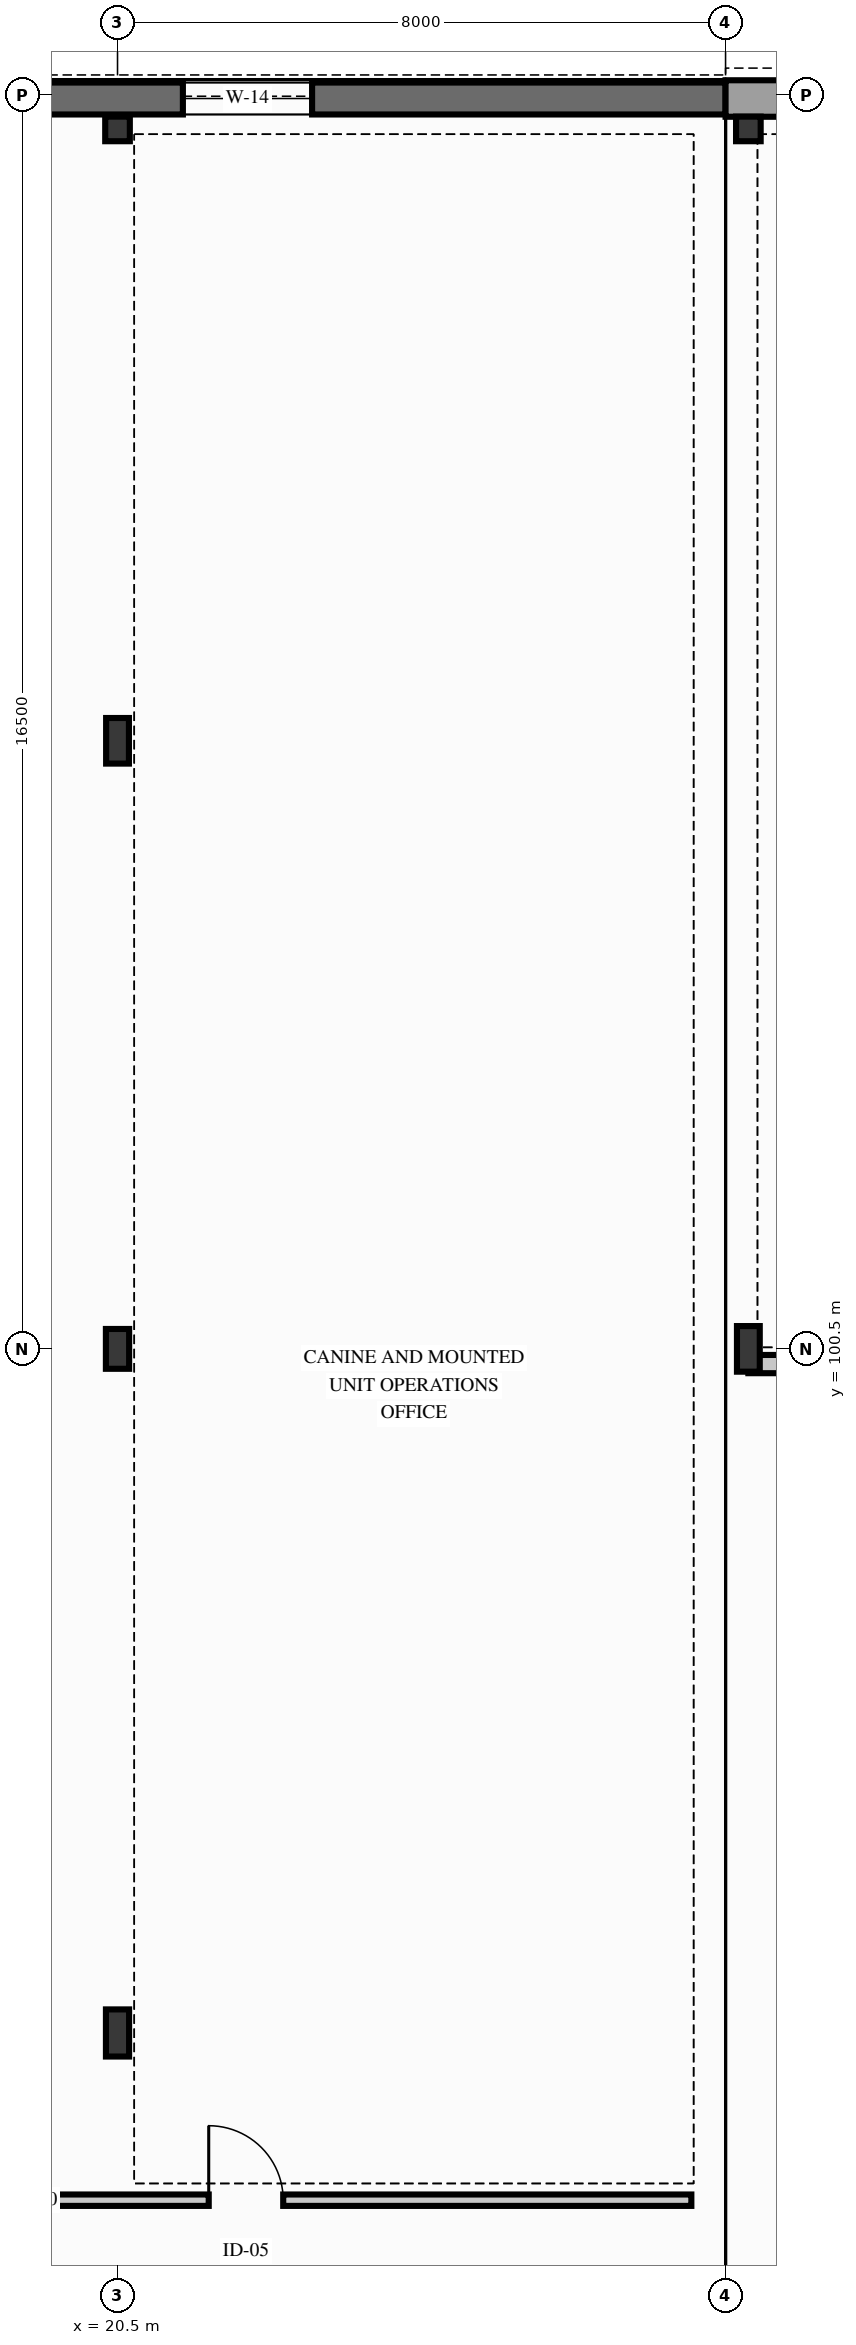
"""IFC4 building model, lengths in metres.
Left out: names, types, materials, properties, quantities, classifications, styles, units other than length and angle.
Written with IfcOpenShell. Run it as: python <this file> out.ifc"""

import sys

from ifc_helpers import new_model, si_unit, direction, frame, frame_2d, origin, origin_2d, place, context, subcontext, project, spatial, rectangle, hollow_circle, i_section, extrude, element, fill, save


model = new_model("IFC4")
c1 = context("Model", 3, precision=1e-05, world=origin(), true_north=direction((0.0, 1.0)))
c2 = subcontext(c1, "Body", "Model", "MODEL_VIEW")
j1 = project(units=[si_unit("LENGTHUNIT", "METRE"), si_unit("PLANEANGLEUNIT", "RADIAN")], contexts=[c1])
p1 = place(None, origin())
s1 = spatial("IfcSite", under=j1, at=p1, CompositionType="ELEMENT")
p2 = place(p1, origin())
s2 = spatial("IfcBuilding", under=s1, at=p2, CompositionType="ELEMENT")
p3 = place(p2, frame((0.0, 0.0, 5.1)))
s3 = spatial("IfcBuildingStorey", under=s2, at=p3, CompositionType="ELEMENT", Elevation=5.1)
p4 = place(p3, frame((28.8, 100.5, 0.0), z_axis=(0.0, 0.0, 1.0), x_axis=(1.0, 0.0, 0.0)))
e1 = element("IfcColumn", 1, at=p4, inside=s3, PredefinedType="COLUMN", context=c2, shape_type="SweptSolid", body=[
    extrude(i_section(OverallWidth=0.3, OverallDepth=0.6, WebThickness=0.015, FlangeThickness=0.03, FilletRadius=0.027, at=origin_2d()), origin(), (0.0, 0.0, 1.0), 4.2),
])
p5 = place(p3, frame((28.8, 116.55, 0.0), z_axis=(0.0, 0.0, 1.0), x_axis=(1.0, 0.0, 0.0)))
e2 = element("IfcColumn", 2, at=p5, inside=s3, PredefinedType="COLUMN", context=c2, shape_type="SweptSolid", body=[
    extrude(hollow_circle(Radius=0.162, WallThickness=0.016, at=origin_2d()), origin(), (0.0, 0.0, 1.0), 4.2),
])
p6 = place(p3, frame((20.5, 91.5, 0.0), z_axis=(0.0, 0.0, 1.0), x_axis=(1.0, 0.0, 0.0)))
e3 = element("IfcColumn", 3, at=p6, inside=s3, PredefinedType="COLUMN", context=c2, shape_type="SweptSolid", body=[
    extrude(i_section(OverallWidth=0.305, OverallDepth=0.62, WebThickness=0.021, FlangeThickness=0.04, FilletRadius=0.027, at=origin_2d()), origin(), (0.0, 0.0, 1.0), 3.94),
])
p7 = place(p3, frame((20.5, 100.5, 0.0), z_axis=(0.0, 0.0, 1.0), x_axis=(1.0, 0.0, 0.0)))
e4 = element("IfcColumn", 4, at=p7, inside=s3, PredefinedType="COLUMN", context=c2, shape_type="SweptSolid", body=[
    extrude(i_section(OverallWidth=0.306, OverallDepth=0.524, WebThickness=0.021, FlangeThickness=0.04, FilletRadius=0.027, at=origin_2d()), origin(), (0.0, 0.0, 1.0), 3.94),
])
p8 = place(p3, frame((20.5, 108.5, 0.0), z_axis=(0.0, 0.0, 1.0), x_axis=(1.0, 0.0, 0.0)))
e5 = element("IfcColumn", 5, at=p8, inside=s3, PredefinedType="COLUMN", context=c2, shape_type="SweptSolid", body=[
    extrude(i_section(OverallWidth=0.3, OverallDepth=0.6, WebThickness=0.015, FlangeThickness=0.03, FilletRadius=0.027, at=origin_2d()), origin(), (0.0, 0.0, 1.0), 3.94),
])
p9 = place(p3, frame((20.5, 116.55, 0.0), z_axis=(0.0, 0.0, 1.0), x_axis=(1.0, 0.0, 0.0)))
e6 = element("IfcColumn", 6, at=p9, inside=s3, PredefinedType="COLUMN", context=c2, shape_type="SweptSolid", body=[
    extrude(hollow_circle(Radius=0.162, WallThickness=0.016, at=origin_2d()), origin(), (0.0, 0.0, 1.0), 3.94),
])
p10 = place(p3, frame((4.51, 116.95, 0.0), z_axis=(0.0, 0.0, 1.0), x_axis=(1.0, 0.0, 0.0)))
e7 = element("IfcWall", 7, at=p10, inside=s3, PredefinedType="SOLIDWALL", context=c2, shape_type="SweptSolid", body=[
    extrude(rectangle(XDim=23.99, YDim=0.42, at=frame_2d((11.995, 0.0))), origin(), (0.0, 0.0, 1.0), 3.94),
])
p11 = place(p10, frame((1.65, 0.0, 0.85)))
e8 = element("IfcOpeningElement", 8, at=p11, cuts=e7, PredefinedType="OPENING", context=c2, shape_type="SweptSolid", body=[
    extrude(rectangle(XDim=1.3, YDim=2.15, at=frame_2d((0.65, 1.075))), frame((0.0, 0.22, 0.0), z_axis=(0.0, -1.0, 0.0), x_axis=(1.0, 0.0, 0.0)), (0.0, 0.0, 1.0), 0.44),
])
p12 = place(p10, frame((5.45, 0.0, 0.85)))
e9 = element("IfcOpeningElement", 9, at=p12, cuts=e7, PredefinedType="OPENING", context=c2, shape_type="SweptSolid", body=[
    extrude(rectangle(XDim=1.5, YDim=2.3, at=frame_2d((0.75, 1.15))), frame((0.0, 0.22, 0.0), z_axis=(0.0, -1.0, 0.0), x_axis=(1.0, 0.0, 0.0)), (0.0, 0.0, 1.0), 0.44),
])
p13 = place(p10, frame((9.25, 0.0, 0.85)))
e10 = element("IfcOpeningElement", 10, at=p13, cuts=e7, PredefinedType="OPENING", context=c2, shape_type="SweptSolid", body=[
    extrude(rectangle(XDim=1.6, YDim=2.4, at=frame_2d((0.8, 1.2))), frame((0.0, 0.22, 0.0), z_axis=(0.0, -1.0, 0.0), x_axis=(1.0, 0.0, 0.0)), (0.0, 0.0, 1.0), 0.44),
])
p14 = place(p10, frame((16.85, 0.0, 0.85)))
e11 = element("IfcOpeningElement", 11, at=p14, cuts=e7, PredefinedType="OPENING", context=c2, shape_type="SweptSolid", body=[
    extrude(rectangle(XDim=1.7, YDim=2.35, at=frame_2d((0.85, 1.175))), frame((0.0, 0.22, 0.0), z_axis=(0.0, -1.0, 0.0), x_axis=(1.0, 0.0, 0.0)), (0.0, 0.0, 1.0), 0.44),
])
p15 = place(p3, frame((28.5, 116.95, 0.0), z_axis=(0.0, 0.0, 1.0), x_axis=(1.0, 0.0, 0.0)))
e12 = element("IfcWall", 12, at=p15, inside=s3, PredefinedType="SOLIDWALL", context=c2, shape_type="SweptSolid", body=[
    extrude(rectangle(XDim=55.76, YDim=0.48, at=frame_2d((27.88, 0.0))), origin(), (0.0, 0.0, 1.0), 3.94),
])
p16 = place(p15, frame((1.65, 0.0, 0.95)))
e13 = element("IfcOpeningElement", 13, at=p16, cuts=e12, PredefinedType="OPENING", context=c2, shape_type="SweptSolid", body=[
    extrude(rectangle(XDim=1.4, YDim=2.2, at=frame_2d((0.7, 1.1))), frame((0.0, 0.25, 0.0), z_axis=(0.0, -1.0, 0.0), x_axis=(1.0, 0.0, 0.0)), (0.0, 0.0, 1.0), 0.5),
])
p17 = place(p15, frame((5.65, 0.0, 0.95)))
e14 = element("IfcOpeningElement", 14, at=p17, cuts=e12, PredefinedType="OPENING", context=c2, shape_type="SweptSolid", body=[
    extrude(rectangle(XDim=1.2, YDim=2.1, at=frame_2d((0.6, 1.05))), frame((0.0, 0.25, 0.0), z_axis=(0.0, -1.0, 0.0), x_axis=(1.0, 0.0, 0.0)), (0.0, 0.0, 1.0), 0.5),
])
p18 = place(p15, frame((9.65, 0.0, 0.95)))
e15 = element("IfcOpeningElement", 15, at=p18, cuts=e12, PredefinedType="OPENING", context=c2, shape_type="SweptSolid", body=[
    extrude(rectangle(XDim=1.1, YDim=1.5, at=frame_2d((0.55, 0.75))), frame((0.0, 0.25, 0.0), z_axis=(0.0, -1.0, 0.0), x_axis=(1.0, 0.0, 0.0)), (0.0, 0.0, 1.0), 0.5),
])
p19 = place(p15, frame((13.65, 0.0, 0.95)))
e16 = element("IfcOpeningElement", 16, at=p19, cuts=e12, PredefinedType="OPENING", context=c2, shape_type="SweptSolid", body=[
    extrude(rectangle(XDim=1.0, YDim=1.6, at=frame_2d((0.5, 0.8))), frame((0.0, 0.25, 0.0), z_axis=(0.0, -1.0, 0.0), x_axis=(1.0, 0.0, 0.0)), (0.0, 0.0, 1.0), 0.5),
])
p20 = place(p15, frame((21.65, 0.0, 0.95)))
e17 = element("IfcOpeningElement", 17, at=p20, cuts=e12, PredefinedType="OPENING", context=c2, shape_type="SweptSolid", body=[
    extrude(rectangle(XDim=1.2, YDim=2.1, at=frame_2d((0.6, 1.05))), frame((0.0, 0.25, 0.0), z_axis=(0.0, -1.0, 0.0), x_axis=(1.0, 0.0, 0.0)), (0.0, 0.0, 1.0), 0.5),
])
p21 = place(p15, frame((29.65, 0.0, 0.95)))
e18 = element("IfcOpeningElement", 18, at=p21, cuts=e12, PredefinedType="OPENING", context=c2, shape_type="SweptSolid", body=[
    extrude(rectangle(XDim=1.0, YDim=1.6, at=frame_2d((0.5, 0.8))), frame((0.0, 0.25, 0.0), z_axis=(0.0, -1.0, 0.0), x_axis=(1.0, 0.0, 0.0)), (0.0, 0.0, 1.0), 0.5),
])
p22 = place(p15, frame((33.65, 0.0, 0.95)))
e19 = element("IfcOpeningElement", 19, at=p22, cuts=e12, PredefinedType="OPENING", context=c2, shape_type="SweptSolid", body=[
    extrude(rectangle(XDim=1.4, YDim=2.2, at=frame_2d((0.7, 1.1))), frame((0.0, 0.25, 0.0), z_axis=(0.0, -1.0, 0.0), x_axis=(1.0, 0.0, 0.0)), (0.0, 0.0, 1.0), 0.5),
])
p23 = place(p15, frame((37.65, 0.0, 0.95)))
e20 = element("IfcOpeningElement", 20, at=p23, cuts=e12, PredefinedType="OPENING", context=c2, shape_type="SweptSolid", body=[
    extrude(rectangle(XDim=1.2, YDim=2.1, at=frame_2d((0.6, 1.05))), frame((0.0, 0.25, 0.0), z_axis=(0.0, -1.0, 0.0), x_axis=(1.0, 0.0, 0.0)), (0.0, 0.0, 1.0), 0.5),
])
p24 = place(p15, frame((41.65, 0.0, 0.95)))
e21 = element("IfcOpeningElement", 21, at=p24, cuts=e12, PredefinedType="OPENING", context=c2, shape_type="SweptSolid", body=[
    extrude(rectangle(XDim=1.1, YDim=1.5, at=frame_2d((0.55, 0.75))), frame((0.0, 0.25, 0.0), z_axis=(0.0, -1.0, 0.0), x_axis=(1.0, 0.0, 0.0)), (0.0, 0.0, 1.0), 0.5),
])
p25 = place(p15, frame((45.65, 0.0, 0.95)))
e22 = element("IfcOpeningElement", 22, at=p25, cuts=e12, PredefinedType="OPENING", context=c2, shape_type="SweptSolid", body=[
    extrude(rectangle(XDim=1.0, YDim=1.6, at=frame_2d((0.5, 0.8))), frame((0.0, 0.25, 0.0), z_axis=(0.0, -1.0, 0.0), x_axis=(1.0, 0.0, 0.0)), (0.0, 0.0, 1.0), 0.5),
])
p26 = place(p3, frame((16.2, 89.3, 0.0), z_axis=(0.0, 0.0, 1.0), x_axis=(1.0, 0.0, 0.0)))
e23 = element("IfcWall", 23, at=p26, inside=s3, PredefinedType="PARTITIONING", context=c2, shape_type="SweptSolid", body=[
    extrude(rectangle(XDim=11.85, YDim=0.15, at=frame_2d((5.925, 0.0))), origin(), (0.0, 0.0, 1.0), 3.92),
])
p27 = place(p26, frame((5.5, 0.0, 0.0)))
e24 = element("IfcOpeningElement", 24, at=p27, cuts=e23, PredefinedType="OPENING", context=c2, shape_type="SweptSolid", body=[
    extrude(rectangle(XDim=0.98, YDim=2.16, at=frame_2d((0.49, 1.08))), frame((0.0, 0.085, 0.0), z_axis=(0.0, -1.0, 0.0), x_axis=(1.0, 0.0, 0.0)), (0.0, 0.0, 1.0), 0.17),
])
p28 = place(p3, frame((28.8, 100.3, 0.0), z_axis=(0.0, 0.0, 1.0), x_axis=(1.0, 0.0, 0.0)))
e25 = element("IfcWall", 25, at=p28, inside=s3, PredefinedType="PARTITIONING", context=c2, shape_type="SweptSolid", body=[
    extrude(rectangle(XDim=55.2, YDim=0.24, at=frame_2d((27.6, 0.0))), origin(), (0.0, 0.0, 1.0), 3.49),
])
p29 = place(p28, frame((9.1, 0.0, 0.0)))
e26 = element("IfcOpeningElement", 26, at=p29, cuts=e25, PredefinedType="OPENING", context=c2, shape_type="SweptSolid", body=[
    extrude(rectangle(XDim=1.12, YDim=2.2, at=frame_2d((0.56, 1.1))), frame((0.0, 0.13, 0.0), z_axis=(0.0, -1.0, 0.0), x_axis=(1.0, 0.0, 0.0)), (0.0, 0.0, 1.0), 0.26),
])
p30 = place(p28, frame((38.0, 0.0, 0.0)))
e27 = element("IfcOpeningElement", 27, at=p30, cuts=e25, PredefinedType="OPENING", context=c2, shape_type="SweptSolid", body=[
    extrude(rectangle(XDim=1.12, YDim=2.2, at=frame_2d((0.56, 1.1))), frame((0.0, 0.13, 0.0), z_axis=(0.0, -1.0, 0.0), x_axis=(1.0, 0.0, 0.0)), (0.0, 0.0, 1.0), 0.26),
])
p31 = place(p14, origin())
e28 = element("IfcWindow", 28, at=p31, inside=s3, PartitioningType="SINGLE_PANEL", PredefinedType="WINDOW", context=c2, shape_type="SweptSolid", body=[
    extrude(rectangle(XDim=1.7, YDim=2.35, at=frame_2d((0.85, 1.175))), frame((0.0, 0.03, 0.0), z_axis=(0.0, -1.0, 0.0), x_axis=(1.0, 0.0, 0.0)), (0.0, 0.0, 1.0), 0.06),
])
fill(e11, e28)
p32 = place(p27, origin())
e29 = element("IfcDoor", 29, at=p32, inside=s3, OperationType="SINGLE_SWING_LEFT", PredefinedType="DOOR", context=c2, shape_type="SweptSolid", body=[
    extrude(rectangle(XDim=0.98, YDim=2.16, at=frame_2d((0.49, 1.08))), frame((0.0, 0.025, 0.0), z_axis=(0.0, -1.0, 0.0), x_axis=(1.0, 0.0, 0.0)), (0.0, 0.0, 1.0), 0.05),
])
fill(e24, e29)
save(model, sys.argv[1])
